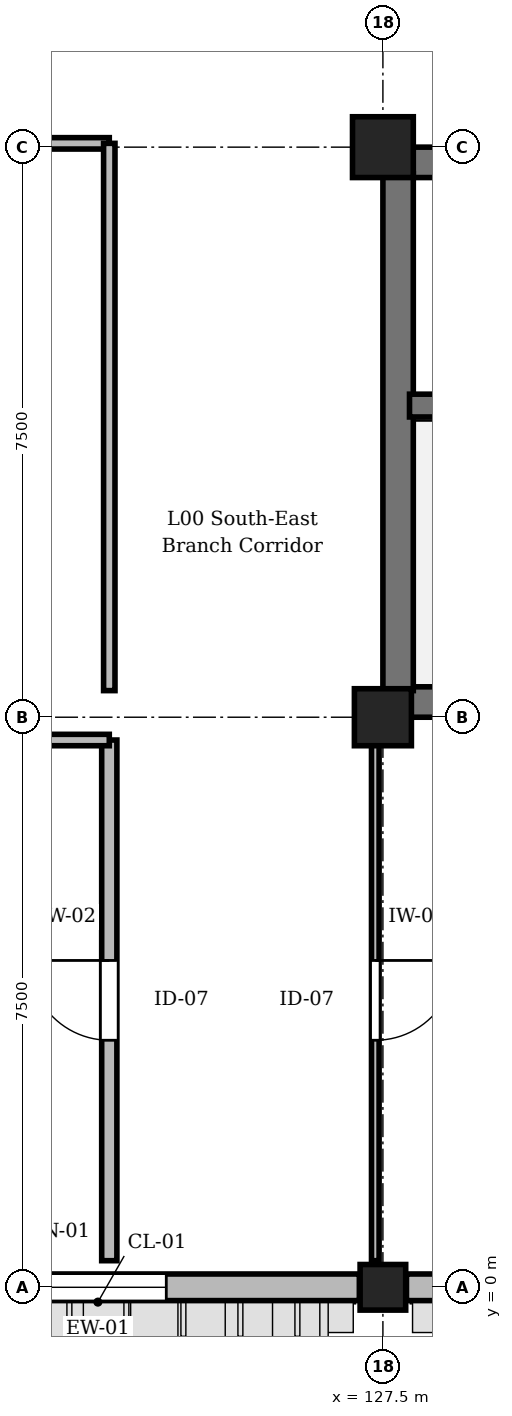
"""IFC4 building model, lengths in metres.
Left out: names, types, materials, properties, quantities, classifications, styles, units other than length and angle.
Written with IfcOpenShell. Run it as: python <this file> out.ifc"""

import sys

from ifc_helpers import new_model, si_unit, direction, frame, frame_2d, origin, origin_2d, place, context, subcontext, project, spatial, rectangle, circle, extrude, element, fill, save


model = new_model("IFC4")
c1 = context("Model", 3, precision=1e-05, world=origin(), true_north=direction((0.0, 1.0)))
c2 = subcontext(c1, "Body", "Model", "MODEL_VIEW")
j1 = project(units=[si_unit("LENGTHUNIT", "METRE"), si_unit("PLANEANGLEUNIT", "RADIAN")], contexts=[c1])
p1 = place(None, origin())
s1 = spatial("IfcSite", under=j1, at=p1, CompositionType="ELEMENT")
p2 = place(p1, origin())
s2 = spatial("IfcBuilding", under=s1, at=p2, CompositionType="ELEMENT")
p3 = place(p2, origin())
s3 = spatial("IfcBuildingStorey", under=s2, at=p3, CompositionType="ELEMENT", Elevation=0.0)
p4 = place(p3, frame((127.5, 0.0, 0.0), z_axis=(0.0, 0.0, 1.0), x_axis=(1.0, 0.0, 0.0)))
e1 = element("IfcColumn", 1, at=p4, inside=s3, PredefinedType="COLUMN", context=c2, shape_type="SweptSolid", body=[
    extrude(rectangle(XDim=0.6, YDim=0.6, at=origin_2d()), origin(), (0.0, 0.0, 1.0), 4.8),
])
p5 = place(p3, frame((127.5, 7.5, 0.0), z_axis=(0.0, 0.0, 1.0), x_axis=(1.0, 0.0, 0.0)))
e2 = element("IfcColumn", 2, at=p5, inside=s3, PredefinedType="COLUMN", context=c2, shape_type="SweptSolid", body=[
    extrude(circle(Radius=0.375, at=origin_2d()), origin(), (0.0, 0.0, 1.0), 4.8),
])
p6 = place(p3, frame((127.5, 15.0, 0.0), z_axis=(0.0, 0.0, 1.0), x_axis=(1.0, 0.0, 0.0)))
e3 = element("IfcColumn", 3, at=p6, inside=s3, PredefinedType="COLUMN", context=c2, shape_type="SweptSolid", body=[
    extrude(rectangle(XDim=0.8, YDim=0.8, at=origin_2d()), origin(), (0.0, 0.0, 1.0), 4.8),
])
p7 = place(p3, frame((127.19, 0.0, 0.0), z_axis=(0.0, 0.0, 1.0), x_axis=(-1.0, 0.0, 0.0)))
e4 = element("IfcWall", 4, at=p7, inside=s3, PredefinedType="STANDARD", context=c2, shape_type="SweptSolid", body=[
    extrude(rectangle(XDim=6.88, YDim=0.35, at=frame_2d((3.44, 0.0))), origin(), (0.0, 0.0, 1.0), 3.95),
])
p8 = place(p7, frame((2.54, 0.0, 0.9)))
e5 = element("IfcOpeningElement", 5, at=p8, cuts=e4, PredefinedType="OPENING", context=c2, shape_type="SweptSolid", body=[
    extrude(rectangle(XDim=1.8, YDim=2.4, at=frame_2d((0.9, 1.2))), frame((0.0, 0.185, 0.0), z_axis=(0.0, -1.0, 0.0), x_axis=(1.0, 0.0, 0.0)), (0.0, 0.0, 1.0), 0.37),
])
p9 = place(p3, frame((134.69, 0.0, 0.0), z_axis=(0.0, 0.0, 1.0), x_axis=(-1.0, 0.0, 0.0)))
e6 = element("IfcWall", 6, at=p9, inside=s3, PredefinedType="STANDARD", context=c2, shape_type="SweptSolid", body=[
    extrude(rectangle(XDim=6.88, YDim=0.35, at=frame_2d((3.44, 0.0))), origin(), (0.0, 0.0, 1.0), 3.95),
])
p10 = place(p9, frame((2.69, 0.0, 0.9)))
e7 = element("IfcOpeningElement", 7, at=p10, cuts=e6, PredefinedType="OPENING", context=c2, shape_type="SweptSolid", body=[
    extrude(rectangle(XDim=1.5, YDim=2.4, at=frame_2d((0.75, 1.2))), frame((0.0, 0.185, 0.0), z_axis=(0.0, -1.0, 0.0), x_axis=(1.0, 0.0, 0.0)), (0.0, 0.0, 1.0), 0.37),
])
p11 = place(p3, frame((127.85, 7.7, 0.0), z_axis=(0.0, 0.0, 1.0), x_axis=(1.0, 0.0, 0.0)))
e8 = element("IfcWall", 8, at=p11, inside=s3, PredefinedType="SHEAR", context=c2, shape_type="SweptSolid", body=[
    extrude(rectangle(XDim=8.05, YDim=0.4, at=frame_2d((4.025, 0.0))), origin(), (0.0, 0.0, 1.0), 4.5),
])
p12 = place(p3, frame((127.85, 14.8, 0.0), z_axis=(0.0, 0.0, 1.0), x_axis=(1.0, 0.0, 0.0)))
e9 = element("IfcWall", 9, at=p12, inside=s3, PredefinedType="SHEAR", context=c2, shape_type="SweptSolid", body=[
    extrude(rectangle(XDim=14.3, YDim=0.4, at=frame_2d((7.15, 0.0))), origin(), (0.0, 0.0, 1.0), 4.5),
])
p13 = place(p3, frame((127.7, 7.85, 0.0), z_axis=(0.0, 0.0, 1.0), x_axis=(0.0, 1.0, 0.0)))
e10 = element("IfcWall", 10, at=p13, inside=s3, PredefinedType="SHEAR", context=c2, shape_type="SweptSolid", body=[
    extrude(rectangle(XDim=6.8, YDim=0.4, at=frame_2d((3.4, 0.0))), origin(), (0.0, 0.0, 1.0), 4.5),
])
p14 = place(p3, frame((127.85, 11.6, 0.0), z_axis=(0.0, 0.0, 1.0), x_axis=(1.0, 0.0, 0.0)))
e11 = element("IfcWall", 11, at=p14, inside=s3, PredefinedType="SHEAR", context=c2, shape_type="SweptSolid", body=[
    extrude(rectangle(XDim=8.05, YDim=0.3, at=frame_2d((4.025, 0.0))), origin(), (0.0, 0.0, 1.0), 4.5),
])
p15 = place(p3, frame((123.9, 0.35, 0.0), z_axis=(0.0, 0.0, 1.0), x_axis=(0.0, 1.0, 0.0)))
e12 = element("IfcWall", 12, at=p15, inside=s3, PredefinedType="STANDARD", context=c2, shape_type="SweptSolid", body=[
    extrude(rectangle(XDim=6.85, YDim=0.2, at=frame_2d((3.425, 0.0))), origin(), (0.0, 0.0, 1.0), 4.485),
])
p16 = place(p15, frame((2.9, 0.0, 0.0)))
e13 = element("IfcOpeningElement", 13, at=p16, cuts=e12, PredefinedType="OPENING", context=c2, shape_type="SweptSolid", body=[
    extrude(rectangle(XDim=1.05, YDim=2.2, at=frame_2d((0.525, 1.1))), frame((0.0, 0.11, 0.0), z_axis=(0.0, -1.0, 0.0), x_axis=(1.0, 0.0, 0.0)), (0.0, 0.0, 1.0), 0.22),
])
p17 = place(p3, frame((127.4, 7.2, 0.0), z_axis=(0.0, 0.0, 1.0), x_axis=(0.0, -1.0, 0.0)))
e14 = element("IfcWall", 14, at=p17, inside=s3, PredefinedType="PARTITIONING", context=c2, shape_type="SweptSolid", body=[
    extrude(rectangle(XDim=6.85, YDim=0.1, at=frame_2d((3.425, 0.0))), origin(), (0.0, 0.0, 1.0), 3.985),
])
p18 = place(p17, frame((2.9, 0.0, 0.0)))
e15 = element("IfcOpeningElement", 15, at=p18, cuts=e14, PredefinedType="OPENING", context=c2, shape_type="SweptSolid", body=[
    extrude(rectangle(XDim=1.05, YDim=2.2, at=frame_2d((0.525, 1.1))), frame((0.0, 0.06, 0.0), z_axis=(0.0, -1.0, 0.0), x_axis=(1.0, 0.0, 0.0)), (0.0, 0.0, 1.0), 0.12),
])
p19 = place(p3, frame((123.9, 15.05, 0.0), z_axis=(0.0, 0.0, 1.0), x_axis=(-1.0, 0.0, 0.0)))
e16 = element("IfcWall", 16, at=p19, inside=s3, PredefinedType="PARTITIONING", context=c2, shape_type="SweptSolid", body=[
    extrude(rectangle(XDim=11.05, YDim=0.15, at=frame_2d((5.525, 0.0))), origin(), (0.0, 0.0, 1.0), 3.835),
])
p20 = place(p19, frame((6.76, 0.0, 0.0)))
e17 = element("IfcOpeningElement", 17, at=p20, cuts=e16, PredefinedType="OPENING", context=c2, shape_type="SweptSolid", body=[
    extrude(rectangle(XDim=1.25, YDim=2.2, at=frame_2d((0.625, 1.1))), frame((0.0, 0.085, 0.0), z_axis=(0.0, -1.0, 0.0), x_axis=(1.0, 0.0, 0.0)), (0.0, 0.0, 1.0), 0.17),
])
p21 = place(p3, frame((112.85, 7.2, 0.0), z_axis=(0.0, 0.0, 1.0), x_axis=(1.0, 0.0, 0.0)))
e18 = element("IfcWall", 18, at=p21, inside=s3, PredefinedType="PARTITIONING", context=c2, shape_type="SweptSolid", body=[
    extrude(rectangle(XDim=11.05, YDim=0.15, at=frame_2d((5.525, 0.0))), origin(), (0.0, 0.0, 1.0), 3.835),
])
p22 = place(p3, frame((123.9, 7.85, 0.0), z_axis=(0.0, 0.0, 1.0), x_axis=(0.0, 1.0, 0.0)))
e19 = element("IfcWall", 19, at=p22, inside=s3, PredefinedType="PARTITIONING", context=c2, shape_type="SweptSolid", body=[
    extrude(rectangle(XDim=7.2, YDim=0.15, at=frame_2d((3.6, 0.0))), origin(), (0.0, 0.0, 1.0), 4.485),
])
p23 = place(p8, origin())
e20 = element("IfcWindow", 20, at=p23, inside=s3, PartitioningType="SINGLE_PANEL", PredefinedType="WINDOW", context=c2, shape_type="SweptSolid", body=[
    extrude(rectangle(XDim=1.8, YDim=2.4, at=frame_2d((0.9, 1.2))), frame((0.0, 0.03, 0.0), z_axis=(0.0, -1.0, 0.0), x_axis=(1.0, 0.0, 0.0)), (0.0, 0.0, 1.0), 0.06),
])
fill(e5, e20)
p24 = place(p16, origin())
e21 = element("IfcDoor", 21, at=p24, inside=s3, OperationType="SINGLE_SWING_RIGHT", PredefinedType="DOOR", context=c2, shape_type="SweptSolid", body=[
    extrude(rectangle(XDim=1.05, YDim=2.2, at=frame_2d((0.525, 1.1))), frame((0.0, 0.025, 0.0), z_axis=(0.0, -1.0, 0.0), x_axis=(1.0, 0.0, 0.0)), (0.0, 0.0, 1.0), 0.05),
])
fill(e13, e21)
p25 = place(p18, origin())
e22 = element("IfcDoor", 22, at=p25, inside=s3, OperationType="SINGLE_SWING_LEFT", PredefinedType="DOOR", context=c2, shape_type="SweptSolid", body=[
    extrude(rectangle(XDim=1.05, YDim=2.2, at=frame_2d((0.525, 1.1))), frame((0.0, 0.025, 0.0), z_axis=(0.0, -1.0, 0.0), x_axis=(1.0, 0.0, 0.0)), (0.0, 0.0, 1.0), 0.05),
])
fill(e15, e22)
save(model, sys.argv[1])
